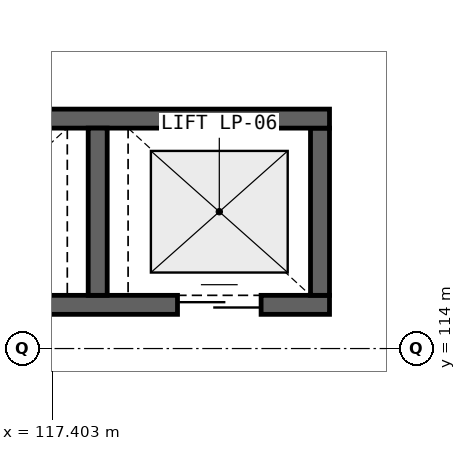
"""IFC4 building model, lengths in metres.
Left out: names, types, materials, properties, quantities, classifications, styles, units other than length and angle.
Written with IfcOpenShell. Run it as: python <this file> out.ifc"""

import sys

from ifc_helpers import new_model, si_unit, direction, frame, frame_2d, origin, place, context, subcontext, project, spatial, rectangle, extrude, element, fill, save


model = new_model("IFC4")
c1 = context("Model", 3, precision=1e-05, world=origin(), true_north=direction((0.0, 1.0)))
c2 = subcontext(c1, "Body", "Model", "MODEL_VIEW")
j1 = project(units=[si_unit("LENGTHUNIT", "METRE"), si_unit("PLANEANGLEUNIT", "RADIAN")], contexts=[c1])
p1 = place(None, origin())
s1 = spatial("IfcSite", under=j1, at=p1, CompositionType="ELEMENT")
p2 = place(p1, origin())
s2 = spatial("IfcBuilding", under=s1, at=p2, CompositionType="ELEMENT")
p3 = place(p2, origin())
s3 = spatial("IfcBuildingStorey", under=s2, at=p3, CompositionType="ELEMENT", Elevation=0.0)
p4 = place(p3, frame((114.95, 114.575, 0.0), z_axis=(0.0, 0.0, 1.0), x_axis=(1.0, 0.0, 0.0)))
e1 = element("IfcWall", 1, at=p4, inside=s3, PredefinedType="SHEAR", context=c2, shape_type="SweptSolid", body=[
    extrude(rectangle(XDim=6.1, YDim=0.25, at=frame_2d((3.05, 0.0))), origin(), (0.0, 0.0, 1.0), 5.08),
])
p5 = place(p4, frame((0.9, 0.0, 0.0)))
e2 = element("IfcOpeningElement", 2, at=p5, cuts=e1, PredefinedType="OPENING", context=c2, shape_type="SweptSolid", body=[
    extrude(rectangle(XDim=1.1, YDim=2.15, at=frame_2d((0.55, 1.075))), frame((0.0, 0.135, 0.0), z_axis=(0.0, -1.0, 0.0), x_axis=(1.0, 0.0, 0.0)), (0.0, 0.0, 1.0), 0.27),
])
p6 = place(p4, frame((4.1, 0.0, 0.0)))
e3 = element("IfcOpeningElement", 3, at=p6, cuts=e1, PredefinedType="OPENING", context=c2, shape_type="SweptSolid", body=[
    extrude(rectangle(XDim=1.1, YDim=2.15, at=frame_2d((0.55, 1.075))), frame((0.0, 0.135, 0.0), z_axis=(0.0, -1.0, 0.0), x_axis=(1.0, 0.0, 0.0)), (0.0, 0.0, 1.0), 0.27),
])
p7 = place(p3, frame((120.925, 114.7, 0.0), z_axis=(0.0, 0.0, 1.0), x_axis=(0.0, 1.0, 0.0)))
e4 = element("IfcWall", 4, at=p7, inside=s3, PredefinedType="SHEAR", context=c2, shape_type="SweptSolid", body=[
    extrude(rectangle(XDim=2.2, YDim=0.25, at=frame_2d((1.1, 0.0))), origin(), (0.0, 0.0, 1.0), 5.08),
])
p8 = place(p3, frame((121.05, 117.025, 0.0), z_axis=(0.0, 0.0, 1.0), x_axis=(-1.0, 0.0, 0.0)))
e5 = element("IfcWall", 5, at=p8, inside=s3, PredefinedType="SHEAR", context=c2, shape_type="SweptSolid", body=[
    extrude(rectangle(XDim=6.1, YDim=0.25, at=frame_2d((3.05, 0.0))), origin(), (0.0, 0.0, 1.0), 5.08),
])
p9 = place(p3, frame((118.0, 114.7, 0.0), z_axis=(0.0, 0.0, 1.0), x_axis=(0.0, 1.0, 0.0)))
e6 = element("IfcWall", 6, at=p9, inside=s3, PredefinedType="SHEAR", context=c2, shape_type="SweptSolid", body=[
    extrude(rectangle(XDim=2.2, YDim=0.25, at=frame_2d((1.1, 0.0))), origin(), (0.0, 0.0, 1.0), 5.08),
])
p10 = place(p6, origin())
e7 = element("IfcDoor", 7, at=p10, inside=s3, OperationType="DOUBLE_DOOR_SLIDING", PredefinedType="DOOR", context=c2, shape_type="SweptSolid", body=[
    extrude(rectangle(XDim=1.1, YDim=2.15, at=frame_2d((0.55, 1.075))), frame((0.0, 0.025, 0.0), z_axis=(0.0, -1.0, 0.0), x_axis=(1.0, 0.0, 0.0)), (0.0, 0.0, 1.0), 0.05),
])
fill(e3, e7)
save(model, sys.argv[1])
